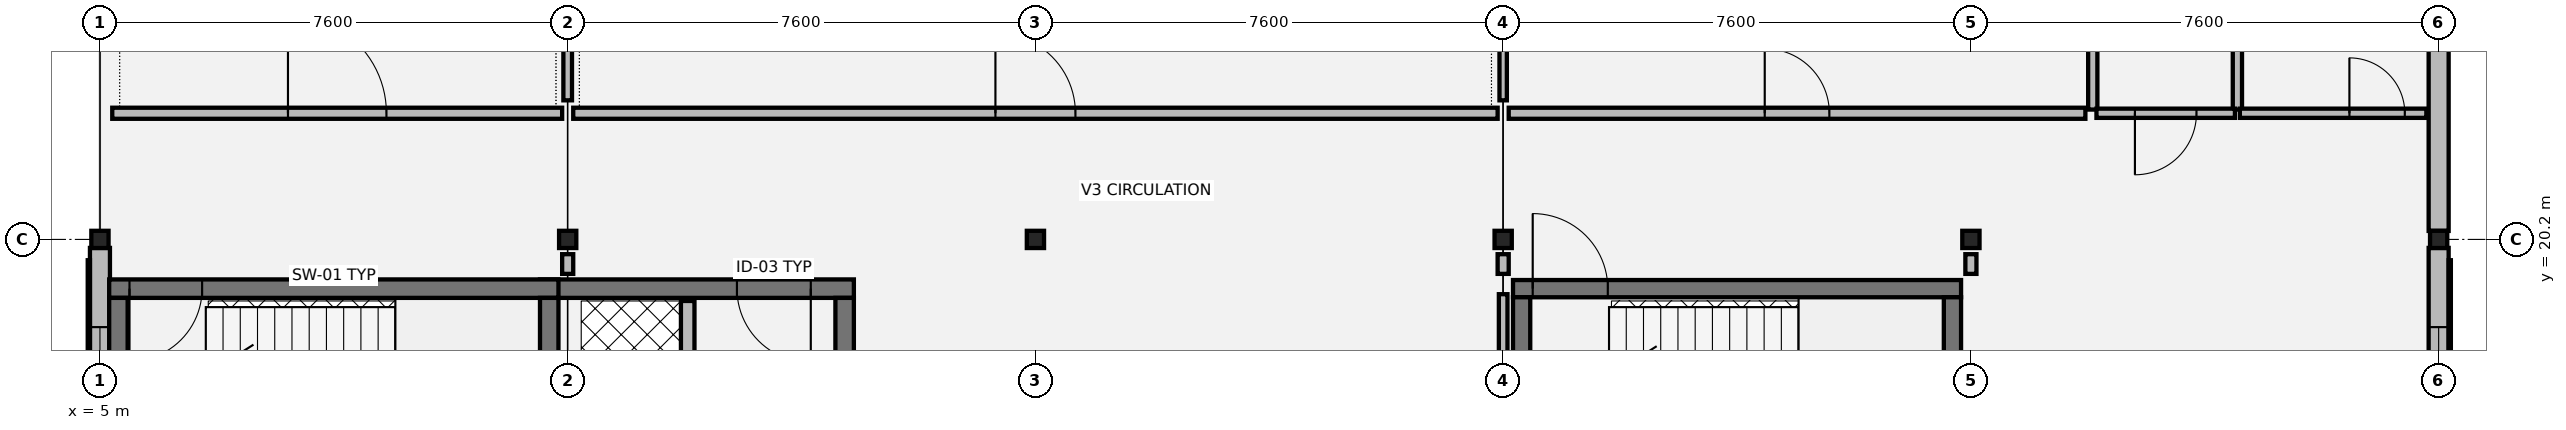
"""IFC4 building model, lengths in metres.
Left out: names, types, materials, properties, quantities, classifications, styles, units other than length and angle.
Written with IfcOpenShell. Run it as: python <this file> out.ifc"""

import sys

from ifc_helpers import new_model, si_unit, direction, frame, frame_2d, origin, origin_2d, place, context, subcontext, project, spatial, rectangle, i_section, extrude, element, fill, save


model = new_model("IFC4")
c1 = context("Model", 3, precision=1e-05, world=origin(), true_north=direction((0.0, 1.0)))
c2 = subcontext(c1, "Body", "Model", "MODEL_VIEW")
j1 = project(units=[si_unit("LENGTHUNIT", "METRE"), si_unit("PLANEANGLEUNIT", "RADIAN")], contexts=[c1])
p1 = place(None, origin())
s1 = spatial("IfcSite", under=j1, at=p1, CompositionType="ELEMENT")
p2 = place(p1, origin())
s2 = spatial("IfcBuilding", under=s1, at=p2, CompositionType="ELEMENT")
p3 = place(p2, frame((0.0, 0.0, 5.1)))
s3 = spatial("IfcBuildingStorey", under=s2, at=p3, CompositionType="ELEMENT", Elevation=5.1)
for number, where, z_axis, x_axis in (
    (1, (5.0, 20.2, 0.0), (0.0, 0.0, 1.0), (1.0, 0.0, 0.0)),
    (2, (12.6, 20.2, 0.0), (0.0, 0.0, 1.0), (1.0, 0.0, 0.0)),
    (3, (20.2, 20.2, 0.0), (0.0, 0.0, 1.0), (1.0, 0.0, 0.0)),
    (4, (27.8, 20.2, 0.0), (0.0, 0.0, 1.0), (1.0, 0.0, 0.0)),
    (5, (35.4, 20.2, 0.0), (0.0, 0.0, 1.0), (1.0, 0.0, 0.0)),
    (6, (43.0, 20.2, 0.0), (0.0, 0.0, 1.0), (1.0, 0.0, 0.0)),
):
    element("IfcColumn", number, at=place(p3, frame(where, z_axis=z_axis, x_axis=x_axis)), inside=s3, PredefinedType="COLUMN", context=c2, shape_type="SweptSolid", body=[
        extrude(i_section(OverallWidth=0.28, OverallDepth=0.28, WebThickness=0.01, FlangeThickness=0.018, at=origin_2d()), origin(), (0.0, 0.0, 1.0), 4.055),
    ])
p4 = place(p3, frame((43.0, 12.738, 0.0), z_axis=(0.0, 0.0, 1.0), x_axis=(0.0, 1.0, 0.0)))
e7 = element("IfcWall", 7, at=p4, inside=s3, PredefinedType="SOLIDWALL", context=c2, shape_type="SweptSolid", body=[
    extrude(rectangle(XDim=7.324, YDim=0.325, at=frame_2d((3.662, 0.0))), origin(), (0.0, 0.0, 1.0), 3.48),
])
p5 = place(p4, frame((1.287, 0.0, 0.8)))
e8 = element("IfcOpeningElement", 8, at=p5, cuts=e7, PredefinedType="OPENING", context=c2, shape_type="SweptSolid", body=[
    extrude(rectangle(XDim=2.05, YDim=2.18, at=frame_2d((1.025, 1.09))), frame((0.0, 0.172, 0.0), z_axis=(0.0, -1.0, 0.0), x_axis=(1.0, 0.0, 0.0)), (0.0, 0.0, 1.0), 0.345),
])
p6 = place(p4, frame((3.987, 0.0, 0.8)))
e9 = element("IfcOpeningElement", 9, at=p6, cuts=e7, PredefinedType="OPENING", context=c2, shape_type="SweptSolid", body=[
    extrude(rectangle(XDim=2.05, YDim=2.18, at=frame_2d((1.025, 1.09))), frame((0.0, 0.172, 0.0), z_axis=(0.0, -1.0, 0.0), x_axis=(1.0, 0.0, 0.0)), (0.0, 0.0, 1.0), 0.345),
])
p7 = place(p3, frame((43.0, 20.338, 0.0), z_axis=(0.0, 0.0, 1.0), x_axis=(0.0, 1.0, 0.0)))
e10 = element("IfcWall", 10, at=p7, inside=s3, PredefinedType="SOLIDWALL", context=c2, shape_type="SweptSolid", body=[
    extrude(rectangle(XDim=7.324, YDim=0.325, at=frame_2d((3.662, 0.0))), origin(), (0.0, 0.0, 1.0), 3.48),
])
p8 = place(p3, frame((5.0, 20.062, 0.0), z_axis=(0.0, 0.0, 1.0), x_axis=(0.0, -1.0, 0.0)))
e11 = element("IfcWall", 11, at=p8, inside=s3, PredefinedType="SOLIDWALL", context=c2, shape_type="SweptSolid", body=[
    extrude(rectangle(XDim=7.324, YDim=0.325, at=frame_2d((3.662, 0.0))), origin(), (0.0, 0.0, 1.0), 2.445),
])
p9 = place(p8, frame((1.287, 0.0, 0.25)))
e12 = element("IfcOpeningElement", 12, at=p9, cuts=e11, PredefinedType="OPENING", context=c2, shape_type="SweptSolid", body=[
    extrude(rectangle(XDim=2.05, YDim=2.18, at=frame_2d((1.025, 1.09))), frame((0.0, 0.172, 0.0), z_axis=(0.0, -1.0, 0.0), x_axis=(1.0, 0.0, 0.0)), (0.0, 0.0, 1.0), 0.345),
])
p10 = place(p8, frame((3.987, 0.0, 0.25)))
e13 = element("IfcOpeningElement", 13, at=p10, cuts=e11, PredefinedType="OPENING", context=c2, shape_type="SweptSolid", body=[
    extrude(rectangle(XDim=2.05, YDim=2.18, at=frame_2d((1.025, 1.09))), frame((0.0, 0.172, 0.0), z_axis=(0.0, -1.0, 0.0), x_axis=(1.0, 0.0, 0.0)), (0.0, 0.0, 1.0), 0.345),
])
p11 = place(p3, frame((17.25, 19.4, 0.0), z_axis=(0.0, 0.0, 1.0), x_axis=(-1.0, 0.0, 0.0)))
e14 = element("IfcWall", 14, at=p11, inside=s3, PredefinedType="SHEAR", context=c2, shape_type="SweptSolid", body=[
    extrude(rectangle(XDim=5.1, YDim=0.3, at=frame_2d((2.55, 0.0))), origin(), (0.0, 0.0, 1.0), 3.902),
])
p12 = place(p11, frame((0.7, 0.0, 0.0)))
e15 = element("IfcOpeningElement", 15, at=p12, cuts=e14, PredefinedType="OPENING", context=c2, shape_type="SweptSolid", body=[
    extrude(rectangle(XDim=1.2, YDim=2.16, at=frame_2d((0.6, 1.08))), frame((0.0, 0.16, 0.0), z_axis=(0.0, -1.0, 0.0), x_axis=(1.0, 0.0, 0.0)), (0.0, 0.0, 1.0), 0.32),
])
p13 = place(p3, frame((17.1, 13.55, 0.0), z_axis=(0.0, 0.0, 1.0), x_axis=(0.0, 1.0, 0.0)))
e16 = element("IfcWall", 16, at=p13, inside=s3, PredefinedType="SHEAR", context=c2, shape_type="SweptSolid", body=[
    extrude(rectangle(XDim=5.7, YDim=0.3, at=frame_2d((2.85, 0.0))), origin(), (0.0, 0.0, 1.0), 3.902),
])
p14 = place(p3, frame((14.55, 13.6, 0.0), z_axis=(0.0, 0.0, 1.0), x_axis=(0.0, 1.0, 0.0)))
e17 = element("IfcWall", 17, at=p14, inside=s3, PredefinedType="SOLIDWALL", context=c2, shape_type="SweptSolid", body=[
    extrude(rectangle(XDim=5.6, YDim=0.22, at=frame_2d((2.8, 0.0))), origin(), (0.0, 0.0, 1.0), 3.902),
])
p15 = place(p14, frame((0.35, 0.0, 0.0)))
e18 = element("IfcOpeningElement", 18, at=p15, cuts=e17, PredefinedType="OPENING", context=c2, shape_type="SweptSolid", body=[
    extrude(rectangle(XDim=1.1, YDim=2.15, at=frame_2d((0.55, 1.075))), frame((0.0, 0.12, 0.0), z_axis=(0.0, -1.0, 0.0), x_axis=(1.0, 0.0, 0.0)), (0.0, 0.0, 1.0), 0.24),
])
p16 = place(p3, frame((5.15, 19.4, 0.0), z_axis=(0.0, 0.0, 1.0), x_axis=(1.0, 0.0, 0.0)))
e19 = element("IfcWall", 19, at=p16, inside=s3, PredefinedType="SHEAR", context=c2, shape_type="SweptSolid", body=[
    extrude(rectangle(XDim=7.3, YDim=0.3, at=frame_2d((3.65, 0.0))), origin(), (0.0, 0.0, 1.0), 3.902),
])
p17 = place(p16, frame((0.33, 0.0, 0.0)))
e20 = element("IfcOpeningElement", 20, at=p17, cuts=e19, PredefinedType="OPENING", context=c2, shape_type="SweptSolid", body=[
    extrude(rectangle(XDim=1.18, YDim=2.18, at=frame_2d((0.59, 1.09))), frame((0.0, 0.16, 0.0), z_axis=(0.0, -1.0, 0.0), x_axis=(1.0, 0.0, 0.0)), (0.0, 0.0, 1.0), 0.32),
])
for number, where, z_axis, x_axis in (
    (21, (5.3, 13.55, 0.0), (0.0, 0.0, 1.0), (0.0, 1.0, 0.0)),
    (22, (12.3, 13.55, 0.0), (0.0, 0.0, 1.0), (0.0, 1.0, 0.0)),
):
    element("IfcWall", number, at=place(p3, frame(where, z_axis=z_axis, x_axis=x_axis)), inside=s3, PredefinedType="SHEAR", context=c2, shape_type="SweptSolid", body=[
        extrude(rectangle(XDim=5.7, YDim=0.3, at=frame_2d((2.85, 0.0))), origin(), (0.0, 0.0, 1.0), 3.902),
    ])
p18 = place(p3, frame((27.96, 19.4, 0.0), z_axis=(0.0, 0.0, 1.0), x_axis=(1.0, 0.0, 0.0)))
e23 = element("IfcWall", 23, at=p18, inside=s3, PredefinedType="SHEAR", context=c2, shape_type="SweptSolid", body=[
    extrude(rectangle(XDim=7.28, YDim=0.28, at=frame_2d((3.64, 0.0))), origin(), (0.0, 0.0, 1.0), 3.902),
])
p19 = place(p18, frame((0.32, 0.0, 0.0)))
e24 = element("IfcOpeningElement", 24, at=p19, cuts=e23, PredefinedType="OPENING", context=c2, shape_type="SweptSolid", body=[
    extrude(rectangle(XDim=1.22, YDim=2.18, at=frame_2d((0.61, 1.09))), frame((0.0, 0.15, 0.0), z_axis=(0.0, -1.0, 0.0), x_axis=(1.0, 0.0, 0.0)), (0.0, 0.0, 1.0), 0.3),
])
for number, where, z_axis, x_axis in (
    (25, (28.1, 13.54, 0.0), (0.0, 0.0, 1.0), (0.0, 1.0, 0.0)),
    (26, (35.1, 13.54, 0.0), (0.0, 0.0, 1.0), (0.0, 1.0, 0.0)),
):
    element("IfcWall", number, at=place(p3, frame(where, z_axis=z_axis, x_axis=x_axis)), inside=s3, PredefinedType="SHEAR", context=c2, shape_type="SweptSolid", body=[
        extrude(rectangle(XDim=5.72, YDim=0.28, at=frame_2d((2.86, 0.0))), origin(), (0.0, 0.0, 1.0), 3.902),
    ])
for number, where, z_axis, x_axis in (
    (27, (37.38, 22.31, 0.0), (0.0, 0.0, 1.0), (0.0, 1.0, 0.0)),
    (28, (39.73, 22.31, 0.0), (0.0, 0.0, 1.0), (0.0, 1.0, 0.0)),
):
    element("IfcWall", number, at=place(p3, frame(where, z_axis=z_axis, x_axis=x_axis)), inside=s3, PredefinedType="PARTITIONING", context=c2, shape_type="SweptSolid", body=[
        extrude(rectangle(XDim=2.36, YDim=0.15, at=frame_2d((1.18, 0.0))), origin(), (0.0, 0.0, 1.0), 3.18),
    ])
p20 = place(p3, frame((37.44, 22.25, 0.0), z_axis=(0.0, 0.0, 1.0), x_axis=(1.0, 0.0, 0.0)))
e29 = element("IfcWall", 29, at=p20, inside=s3, PredefinedType="PARTITIONING", context=c2, shape_type="SweptSolid", body=[
    extrude(rectangle(XDim=2.25, YDim=0.15, at=frame_2d((1.125, 0.0))), origin(), (0.0, 0.0, 1.0), 3.18),
])
p21 = place(p20, frame((0.625, 0.0, 0.0)))
e30 = element("IfcOpeningElement", 30, at=p21, cuts=e29, PredefinedType="OPENING", context=c2, shape_type="SweptSolid", body=[
    extrude(rectangle(XDim=1.0, YDim=2.15, at=frame_2d((0.5, 1.075))), frame((0.0, 0.085, 0.0), z_axis=(0.0, -1.0, 0.0), x_axis=(1.0, 0.0, 0.0)), (0.0, 0.0, 1.0), 0.17),
])
p22 = place(p3, frame((39.77, 22.25, 0.0), z_axis=(0.0, 0.0, 1.0), x_axis=(1.0, 0.0, 0.0)))
e31 = element("IfcWall", 31, at=p22, inside=s3, PredefinedType="PARTITIONING", context=c2, shape_type="SweptSolid", body=[
    extrude(rectangle(XDim=3.03, YDim=0.15, at=frame_2d((1.515, 0.0))), origin(), (0.0, 0.0, 1.0), 3.18),
])
p23 = place(p22, frame((1.78, 0.0, 0.0)))
e32 = element("IfcOpeningElement", 32, at=p23, cuts=e31, PredefinedType="OPENING", context=c2, shape_type="SweptSolid", body=[
    extrude(rectangle(XDim=0.9, YDim=2.15, at=frame_2d((0.45, 1.075))), frame((0.0, 0.085, 0.0), z_axis=(0.0, -1.0, 0.0), x_axis=(1.0, 0.0, 0.0)), (0.0, 0.0, 1.0), 0.17),
])
p24 = place(p3, frame((5.2, 22.25, 0.0), z_axis=(0.0, 0.0, 1.0), x_axis=(1.0, 0.0, 0.0)))
e33 = element("IfcWall", 33, at=p24, inside=s3, PredefinedType="PARTITIONING", context=c2, shape_type="SweptSolid", body=[
    extrude(rectangle(XDim=7.31, YDim=0.18, at=frame_2d((3.655, 0.0))), origin(), (0.0, 0.0, 1.0), 3.18),
])
p25 = place(p24, frame((2.855, 0.0, 0.0)))
e34 = element("IfcOpeningElement", 34, at=p25, cuts=e33, PredefinedType="OPENING", context=c2, shape_type="SweptSolid", body=[
    extrude(rectangle(XDim=1.6, YDim=2.25, at=frame_2d((0.8, 1.125))), frame((0.0, 0.1, 0.0), z_axis=(0.0, -1.0, 0.0), x_axis=(1.0, 0.0, 0.0)), (0.0, 0.0, 1.0), 0.2),
])
p26 = place(p3, frame((12.69, 22.25, 0.0), z_axis=(0.0, 0.0, 1.0), x_axis=(1.0, 0.0, 0.0)))
e35 = element("IfcWall", 35, at=p26, inside=s3, PredefinedType="PARTITIONING", context=c2, shape_type="SweptSolid", body=[
    extrude(rectangle(XDim=15.02, YDim=0.18, at=frame_2d((7.51, 0.0))), origin(), (0.0, 0.0, 1.0), 3.18),
])
p27 = place(p26, frame((6.86, 0.0, 0.0)))
e36 = element("IfcOpeningElement", 36, at=p27, cuts=e35, PredefinedType="OPENING", context=c2, shape_type="SweptSolid", body=[
    extrude(rectangle(XDim=1.3, YDim=2.2, at=frame_2d((0.65, 1.1))), frame((0.0, 0.1, 0.0), z_axis=(0.0, -1.0, 0.0), x_axis=(1.0, 0.0, 0.0)), (0.0, 0.0, 1.0), 0.2),
])
p28 = place(p3, frame((27.89, 22.25, 0.0), z_axis=(0.0, 0.0, 1.0), x_axis=(1.0, 0.0, 0.0)))
e37 = element("IfcWall", 37, at=p28, inside=s3, PredefinedType="PARTITIONING", context=c2, shape_type="SweptSolid", body=[
    extrude(rectangle(XDim=9.37, YDim=0.18, at=frame_2d((4.685, 0.0))), origin(), (0.0, 0.0, 1.0), 3.18),
])
p29 = place(p28, frame((4.16, 0.0, 0.0)))
e38 = element("IfcOpeningElement", 38, at=p29, cuts=e37, PredefinedType="OPENING", context=c2, shape_type="SweptSolid", body=[
    extrude(rectangle(XDim=1.05, YDim=2.15, at=frame_2d((0.525, 1.075))), frame((0.0, 0.1, 0.0), z_axis=(0.0, -1.0, 0.0), x_axis=(1.0, 0.0, 0.0)), (0.0, 0.0, 1.0), 0.2),
])
for number, where, z_axis, x_axis in (
    (39, (12.6, 19.64, 0.0), (0.0, 0.0, 1.0), (0.0, 1.0, 0.0)),
    (40, (27.8, 19.64, 0.0), (0.0, 0.0, 1.0), (0.0, 1.0, 0.0)),
    (41, (35.4, 19.64, 0.0), (0.0, 0.0, 1.0), (0.0, 1.0, 0.0)),
):
    element("IfcWall", number, at=place(p3, frame(where, z_axis=z_axis, x_axis=x_axis)), inside=s3, PredefinedType="PARTITIONING", context=c2, shape_type="SweptSolid", body=[
        extrude(rectangle(XDim=0.32, YDim=0.18, at=frame_2d((0.16, 0.0))), origin(), (0.0, 0.0, 1.0), 3.18),
    ])
p30 = place(p3, frame((12.6, 22.46, 0.0), z_axis=(0.0, 0.0, 1.0), x_axis=(0.0, 1.0, 0.0)))
e42 = element("IfcWall", 42, at=p30, inside=s3, PredefinedType="PARTITIONING", context=c2, shape_type="SweptSolid", body=[
    extrude(rectangle(XDim=12.62, YDim=0.14, at=frame_2d((6.31, 0.0))), origin(), (0.0, 0.0, 1.0), 3.18),
])
p31 = place(p3, frame((27.8, 22.46, 0.0), z_axis=(0.0, 0.0, 1.0), x_axis=(0.0, 1.0, 0.0)))
e43 = element("IfcWall", 43, at=p31, inside=s3, PredefinedType="PARTITIONING", context=c2, shape_type="SweptSolid", body=[
    extrude(rectangle(XDim=12.62, YDim=0.12, at=frame_2d((6.31, 0.0))), origin(), (0.0, 0.0, 1.0), 3.18),
])
p32 = place(p3, frame((27.8, 5.32, 0.0), z_axis=(0.0, 0.0, 1.0), x_axis=(0.0, 1.0, 0.0)))
e44 = element("IfcWall", 44, at=p32, inside=s3, PredefinedType="PARTITIONING", context=c2, shape_type="SweptSolid", body=[
    extrude(rectangle(XDim=13.99, YDim=0.14, at=frame_2d((6.995, 0.0))), origin(), (0.0, 0.0, 1.0), 2.445),
])
p33 = place(p32, frame((4.965, 0.0, 0.0)))
e45 = element("IfcOpeningElement", 45, at=p33, cuts=e44, PredefinedType="OPENING", context=c2, shape_type="SweptSolid", body=[
    extrude(rectangle(XDim=1.36, YDim=2.2, at=frame_2d((0.68, 1.1))), frame((0.0, 0.08, 0.0), z_axis=(0.0, -1.0, 0.0), x_axis=(1.0, 0.0, 0.0)), (0.0, 0.0, 1.0), 0.16),
])
p34 = place(p6, origin())
e46 = element("IfcWindow", 46, at=p34, inside=s3, PartitioningType="SINGLE_PANEL", PredefinedType="WINDOW", context=c2, shape_type="SweptSolid", body=[
    extrude(rectangle(XDim=2.05, YDim=2.18, at=frame_2d((1.025, 1.09))), frame((0.0, 0.03, 0.0), z_axis=(0.0, -1.0, 0.0), x_axis=(1.0, 0.0, 0.0)), (0.0, 0.0, 1.0), 0.06),
])
fill(e9, e46)
p35 = place(p9, origin())
e47 = element("IfcWindow", 47, at=p35, inside=s3, PartitioningType="SINGLE_PANEL", PredefinedType="WINDOW", context=c2, shape_type="SweptSolid", body=[
    extrude(rectangle(XDim=2.05, YDim=2.18, at=frame_2d((1.025, 1.09))), frame((0.0, 0.03, 0.0), z_axis=(0.0, -1.0, 0.0), x_axis=(1.0, 0.0, 0.0)), (0.0, 0.0, 1.0), 0.06),
])
fill(e12, e47)
p36 = place(p12, origin())
e48 = element("IfcDoor", 48, at=p36, inside=s3, OperationType="SINGLE_SWING_LEFT", PredefinedType="DOOR", context=c2, shape_type="SweptSolid", body=[
    extrude(rectangle(XDim=1.2, YDim=2.16, at=frame_2d((0.6, 1.08))), frame((0.0, 0.025, 0.0), z_axis=(0.0, -1.0, 0.0), x_axis=(1.0, 0.0, 0.0)), (0.0, 0.0, 1.0), 0.05),
])
fill(e15, e48)
p37 = place(p17, origin())
e49 = element("IfcDoor", 49, at=p37, inside=s3, OperationType="SINGLE_SWING_RIGHT", PredefinedType="DOOR", context=c2, shape_type="SweptSolid", body=[
    extrude(rectangle(XDim=1.18, YDim=2.18, at=frame_2d((0.59, 1.09))), frame((0.0, 0.025, 0.0), z_axis=(0.0, -1.0, 0.0), x_axis=(1.0, 0.0, 0.0)), (0.0, 0.0, 1.0), 0.05),
])
fill(e20, e49)
p38 = place(p19, origin())
e50 = element("IfcDoor", 50, at=p38, inside=s3, OperationType="SINGLE_SWING_LEFT", PredefinedType="DOOR", context=c2, shape_type="SweptSolid", body=[
    extrude(rectangle(XDim=1.22, YDim=2.18, at=frame_2d((0.61, 1.09))), frame((0.0, 0.025, 0.0), z_axis=(0.0, -1.0, 0.0), x_axis=(1.0, 0.0, 0.0)), (0.0, 0.0, 1.0), 0.05),
])
fill(e24, e50)
p39 = place(p21, origin())
e51 = element("IfcDoor", 51, at=p39, inside=s3, OperationType="SINGLE_SWING_RIGHT", PredefinedType="DOOR", context=c2, shape_type="SweptSolid", body=[
    extrude(rectangle(XDim=1.0, YDim=2.15, at=frame_2d((0.5, 1.075))), frame((0.0, 0.025, 0.0), z_axis=(0.0, -1.0, 0.0), x_axis=(1.0, 0.0, 0.0)), (0.0, 0.0, 1.0), 0.05),
])
fill(e30, e51)
p40 = place(p23, origin())
e52 = element("IfcDoor", 52, at=p40, inside=s3, OperationType="SINGLE_SWING_LEFT", PredefinedType="DOOR", context=c2, shape_type="SweptSolid", body=[
    extrude(rectangle(XDim=0.9, YDim=2.15, at=frame_2d((0.45, 1.075))), frame((0.0, 0.025, 0.0), z_axis=(0.0, -1.0, 0.0), x_axis=(1.0, 0.0, 0.0)), (0.0, 0.0, 1.0), 0.05),
])
fill(e32, e52)
p41 = place(p25, origin())
e53 = element("IfcDoor", 53, at=p41, inside=s3, OperationType="DOUBLE_DOOR_SINGLE_SWING", PredefinedType="DOOR", context=c2, shape_type="SweptSolid", body=[
    extrude(rectangle(XDim=1.6, YDim=2.25, at=frame_2d((0.8, 1.125))), frame((0.0, 0.025, 0.0), z_axis=(0.0, -1.0, 0.0), x_axis=(1.0, 0.0, 0.0)), (0.0, 0.0, 1.0), 0.05),
])
fill(e34, e53)
p42 = place(p27, origin())
e54 = element("IfcDoor", 54, at=p42, inside=s3, OperationType="SINGLE_SWING_LEFT", PredefinedType="DOOR", context=c2, shape_type="SweptSolid", body=[
    extrude(rectangle(XDim=1.3, YDim=2.2, at=frame_2d((0.65, 1.1))), frame((0.0, 0.025, 0.0), z_axis=(0.0, -1.0, 0.0), x_axis=(1.0, 0.0, 0.0)), (0.0, 0.0, 1.0), 0.05),
])
fill(e36, e54)
p43 = place(p29, origin())
e55 = element("IfcDoor", 55, at=p43, inside=s3, OperationType="SINGLE_SWING_LEFT", PredefinedType="DOOR", context=c2, shape_type="SweptSolid", body=[
    extrude(rectangle(XDim=1.05, YDim=2.15, at=frame_2d((0.525, 1.075))), frame((0.0, 0.025, 0.0), z_axis=(0.0, -1.0, 0.0), x_axis=(1.0, 0.0, 0.0)), (0.0, 0.0, 1.0), 0.05),
])
fill(e38, e55)
save(model, sys.argv[1])
